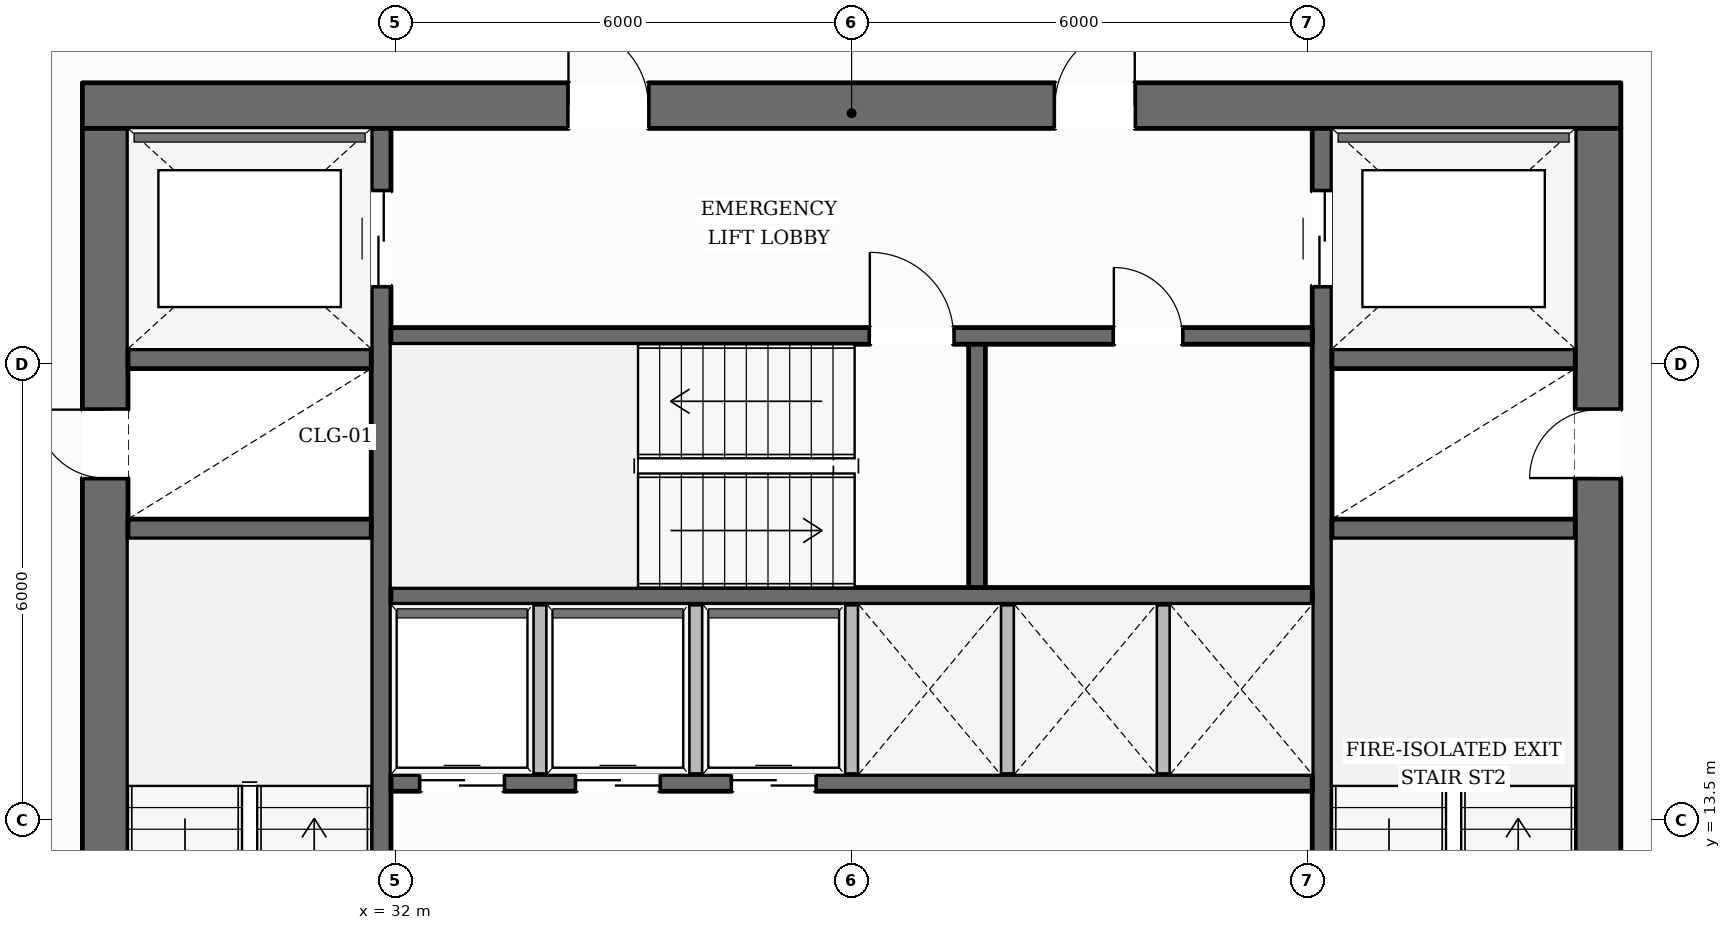
"""IFC4 building model, lengths in metres.
Left out: names, types, materials, properties, quantities, classifications, styles, units other than length and angle.
Written with IfcOpenShell. Run it as: python <this file> out.ifc"""

import sys

from ifc_helpers import new_model, si_unit, direction, frame, frame_2d, origin, place, context, subcontext, project, spatial, rectangle, extrude, element, fill, save


model = new_model("IFC4")
c1 = context("Model", 3, precision=1e-05, world=origin(), true_north=direction((0.0, 1.0)))
c2 = subcontext(c1, "Body", "Model", "MODEL_VIEW")
j1 = project(units=[si_unit("LENGTHUNIT", "METRE"), si_unit("PLANEANGLEUNIT", "RADIAN")], contexts=[c1])
p1 = place(None, origin())
s1 = spatial("IfcSite", under=j1, at=p1, CompositionType="ELEMENT")
p2 = place(p1, origin())
s2 = spatial("IfcBuilding", under=s1, at=p2, CompositionType="ELEMENT")
p3 = place(p2, frame((0.0, 0.0, 29.1)))
s3 = spatial("IfcBuildingStorey", under=s2, at=p3, CompositionType="ELEMENT", Elevation=29.1)
p4 = place(p3, frame((27.88, 22.9, 0.0), z_axis=(0.0, 0.0, 1.0), x_axis=(1.0, 0.0, 0.0)))
e1 = element("IfcWall", 1, at=p4, inside=s3, PredefinedType="SOLIDWALL", context=c2, shape_type="SweptSolid", body=[
    extrude(rectangle(XDim=20.24, YDim=0.6, at=frame_2d((10.12, 0.0))), origin(), (0.0, 0.0, 1.0), 3.59),
])
p5 = place(p4, frame((6.395, 0.0, 0.0)))
e2 = element("IfcOpeningElement", 2, at=p5, cuts=e1, PredefinedType="OPENING", context=c2, shape_type="SweptSolid", body=[
    extrude(rectangle(XDim=1.05, YDim=2.15, at=frame_2d((0.525, 1.075))), frame((0.0, 0.31, 0.0), z_axis=(0.0, -1.0, 0.0), x_axis=(1.0, 0.0, 0.0)), (0.0, 0.0, 1.0), 0.62),
])
p6 = place(p4, frame((12.795, 0.0, 0.0)))
e3 = element("IfcOpeningElement", 3, at=p6, cuts=e1, PredefinedType="OPENING", context=c2, shape_type="SweptSolid", body=[
    extrude(rectangle(XDim=1.05, YDim=2.15, at=frame_2d((0.525, 1.075))), frame((0.0, 0.31, 0.0), z_axis=(0.0, -1.0, 0.0), x_axis=(1.0, 0.0, 0.0)), (0.0, 0.0, 1.0), 0.62),
])
p7 = place(p3, frame((28.18, 9.6, 0.0), z_axis=(0.0, 0.0, 1.0), x_axis=(0.0, 1.0, 0.0)))
e4 = element("IfcWall", 4, at=p7, inside=s3, PredefinedType="SOLIDWALL", context=c2, shape_type="SweptSolid", body=[
    extrude(rectangle(XDim=13.0, YDim=0.6, at=frame_2d((6.5, 0.0))), origin(), (0.0, 0.0, 1.0), 3.59),
])
p8 = place(p7, frame((0.2, 0.0, 0.0)))
e5 = element("IfcOpeningElement", 5, at=p8, cuts=e4, PredefinedType="OPENING", context=c2, shape_type="SweptSolid", body=[
    extrude(rectangle(XDim=1.1, YDim=2.15, at=frame_2d((0.55, 1.075))), frame((0.0, 0.31, 0.0), z_axis=(0.0, -1.0, 0.0), x_axis=(1.0, 0.0, 0.0)), (0.0, 0.0, 1.0), 0.62),
])
p9 = place(p7, frame((8.4, 0.0, 0.0)))
e6 = element("IfcOpeningElement", 6, at=p9, cuts=e4, PredefinedType="OPENING", context=c2, shape_type="SweptSolid", body=[
    extrude(rectangle(XDim=0.9, YDim=2.1, at=frame_2d((0.45, 1.05))), frame((0.0, 0.31, 0.0), z_axis=(0.0, -1.0, 0.0), x_axis=(1.0, 0.0, 0.0)), (0.0, 0.0, 1.0), 0.62),
])
p10 = place(p3, frame((47.82, 9.6, 0.0), z_axis=(0.0, 0.0, 1.0), x_axis=(0.0, 1.0, 0.0)))
e7 = element("IfcWall", 7, at=p10, inside=s3, PredefinedType="SOLIDWALL", context=c2, shape_type="SweptSolid", body=[
    extrude(rectangle(XDim=13.0, YDim=0.6, at=frame_2d((6.5, 0.0))), origin(), (0.0, 0.0, 1.0), 3.59),
])
p11 = place(p10, frame((0.2, 0.0, 0.0)))
e8 = element("IfcOpeningElement", 8, at=p11, cuts=e7, PredefinedType="OPENING", context=c2, shape_type="SweptSolid", body=[
    extrude(rectangle(XDim=1.1, YDim=2.15, at=frame_2d((0.55, 1.075))), frame((0.0, 0.31, 0.0), z_axis=(0.0, -1.0, 0.0), x_axis=(1.0, 0.0, 0.0)), (0.0, 0.0, 1.0), 0.62),
])
p12 = place(p10, frame((8.4, 0.0, 0.0)))
e9 = element("IfcOpeningElement", 9, at=p12, cuts=e7, PredefinedType="OPENING", context=c2, shape_type="SweptSolid", body=[
    extrude(rectangle(XDim=0.9, YDim=2.1, at=frame_2d((0.45, 1.05))), frame((0.0, 0.31, 0.0), z_axis=(0.0, -1.0, 0.0), x_axis=(1.0, 0.0, 0.0)), (0.0, 0.0, 1.0), 0.62),
])
p13 = place(p3, frame((31.81, 9.6, 0.0), z_axis=(0.0, 0.0, 1.0), x_axis=(0.0, 1.0, 0.0)))
e10 = element("IfcWall", 10, at=p13, inside=s3, PredefinedType="SHEAR", context=c2, shape_type="SweptSolid", body=[
    extrude(rectangle(XDim=13.0, YDim=0.26, at=frame_2d((6.5, 0.0))), origin(), (0.0, 0.0, 1.0), 3.59),
])
p14 = place(p13, frame((10.925, 0.0, 0.0)))
e11 = element("IfcOpeningElement", 11, at=p14, cuts=e10, PredefinedType="OPENING", context=c2, shape_type="SweptSolid", body=[
    extrude(rectangle(XDim=1.25, YDim=2.25, at=frame_2d((0.625, 1.125))), frame((0.0, 0.14, 0.0), z_axis=(0.0, -1.0, 0.0), x_axis=(1.0, 0.0, 0.0)), (0.0, 0.0, 1.0), 0.28),
])
p15 = place(p3, frame((44.19, 9.6, 0.0), z_axis=(0.0, 0.0, 1.0), x_axis=(0.0, 1.0, 0.0)))
e12 = element("IfcWall", 12, at=p15, inside=s3, PredefinedType="SHEAR", context=c2, shape_type="SweptSolid", body=[
    extrude(rectangle(XDim=13.0, YDim=0.26, at=frame_2d((6.5, 0.0))), origin(), (0.0, 0.0, 1.0), 3.59),
])
p16 = place(p15, frame((10.925, 0.0, 0.0)))
e13 = element("IfcOpeningElement", 13, at=p16, cuts=e12, PredefinedType="OPENING", context=c2, shape_type="SweptSolid", body=[
    extrude(rectangle(XDim=1.25, YDim=2.25, at=frame_2d((0.625, 1.125))), frame((0.0, 0.14, 0.0), z_axis=(0.0, -1.0, 0.0), x_axis=(1.0, 0.0, 0.0)), (0.0, 0.0, 1.0), 0.28),
])
for number, where, z_axis, x_axis in (
    (14, (28.48, 17.33, 0.0), (0.0, 0.0, 1.0), (1.0, 0.0, 0.0)),
    (15, (28.48, 19.57, 0.0), (0.0, 0.0, 1.0), (1.0, 0.0, 0.0)),
    (16, (44.32, 17.33, 0.0), (0.0, 0.0, 1.0), (1.0, 0.0, 0.0)),
    (17, (44.32, 19.57, 0.0), (0.0, 0.0, 1.0), (1.0, 0.0, 0.0)),
):
    element("IfcWall", number, at=place(p3, frame(where, z_axis=z_axis, x_axis=x_axis)), inside=s3, PredefinedType="SHEAR", context=c2, shape_type="SweptSolid", body=[
        extrude(rectangle(XDim=3.2, YDim=0.26, at=frame_2d((1.6, 0.0))), origin(), (0.0, 0.0, 1.0), 3.59),
    ])
p17 = place(p3, frame((31.94, 19.87, 0.0), z_axis=(0.0, 0.0, 1.0), x_axis=(1.0, 0.0, 0.0)))
e18 = element("IfcWall", 18, at=p17, inside=s3, PredefinedType="SOLIDWALL", context=c2, shape_type="SweptSolid", body=[
    extrude(rectangle(XDim=12.12, YDim=0.22, at=frame_2d((6.06, 0.0))), origin(), (0.0, 0.0, 1.0), 3.59),
])
p18 = place(p17, frame((6.3, 0.0, 0.0)))
e19 = element("IfcOpeningElement", 19, at=p18, cuts=e18, PredefinedType="OPENING", context=c2, shape_type="SweptSolid", body=[
    extrude(rectangle(XDim=1.1, YDim=2.15, at=frame_2d((0.55, 1.075))), frame((0.0, 0.12, 0.0), z_axis=(0.0, -1.0, 0.0), x_axis=(1.0, 0.0, 0.0)), (0.0, 0.0, 1.0), 0.24),
])
p19 = place(p17, frame((9.51, 0.0, 0.0)))
e20 = element("IfcOpeningElement", 20, at=p19, cuts=e18, PredefinedType="OPENING", context=c2, shape_type="SweptSolid", body=[
    extrude(rectangle(XDim=0.9, YDim=2.1, at=frame_2d((0.45, 1.05))), frame((0.0, 0.12, 0.0), z_axis=(0.0, -1.0, 0.0), x_axis=(1.0, 0.0, 0.0)), (0.0, 0.0, 1.0), 0.24),
])
p20 = place(p3, frame((31.94, 16.45, 0.0), z_axis=(0.0, 0.0, 1.0), x_axis=(1.0, 0.0, 0.0)))
e21 = element("IfcWall", 21, at=p20, inside=s3, PredefinedType="SOLIDWALL", context=c2, shape_type="SweptSolid", body=[
    extrude(rectangle(XDim=12.12, YDim=0.22, at=frame_2d((6.06, 0.0))), origin(), (0.0, 0.0, 1.0), 3.59),
])
p21 = place(p3, frame((39.65, 16.56, 0.0), z_axis=(0.0, 0.0, 1.0), x_axis=(0.0, 1.0, 0.0)))
e22 = element("IfcWall", 22, at=p21, inside=s3, PredefinedType="SOLIDWALL", context=c2, shape_type="SweptSolid", body=[
    extrude(rectangle(XDim=3.2, YDim=0.22, at=frame_2d((1.6, 0.0))), origin(), (0.0, 0.0, 1.0), 3.59),
])
p22 = place(p3, frame((31.94, 13.99, 0.0), z_axis=(0.0, 0.0, 1.0), x_axis=(1.0, 0.0, 0.0)))
e23 = element("IfcWall", 23, at=p22, inside=s3, PredefinedType="SOLIDWALL", context=c2, shape_type="SweptSolid", body=[
    extrude(rectangle(XDim=12.12, YDim=0.22, at=frame_2d((6.06, 0.0))), origin(), (0.0, 0.0, 1.0), 3.59),
])
p23 = place(p22, frame((0.385, 0.0, 0.0)))
e24 = element("IfcOpeningElement", 24, at=p23, cuts=e23, PredefinedType="OPENING", context=c2, shape_type="SweptSolid", body=[
    extrude(rectangle(XDim=1.1, YDim=2.2, at=frame_2d((0.55, 1.1))), frame((0.0, 0.12, 0.0), z_axis=(0.0, -1.0, 0.0), x_axis=(1.0, 0.0, 0.0)), (0.0, 0.0, 1.0), 0.24),
])
p24 = place(p22, frame((2.435, 0.0, 0.0)))
e25 = element("IfcOpeningElement", 25, at=p24, cuts=e23, PredefinedType="OPENING", context=c2, shape_type="SweptSolid", body=[
    extrude(rectangle(XDim=1.1, YDim=2.2, at=frame_2d((0.55, 1.1))), frame((0.0, 0.12, 0.0), z_axis=(0.0, -1.0, 0.0), x_axis=(1.0, 0.0, 0.0)), (0.0, 0.0, 1.0), 0.24),
])
p25 = place(p22, frame((4.485, 0.0, 0.0)))
e26 = element("IfcOpeningElement", 26, at=p25, cuts=e23, PredefinedType="OPENING", context=c2, shape_type="SweptSolid", body=[
    extrude(rectangle(XDim=1.1, YDim=2.2, at=frame_2d((0.55, 1.1))), frame((0.0, 0.12, 0.0), z_axis=(0.0, -1.0, 0.0), x_axis=(1.0, 0.0, 0.0)), (0.0, 0.0, 1.0), 0.24),
])
p26 = place(p3, frame((13.263, 14.928, 0.0), z_axis=(0.0, 0.0, 1.0), x_axis=(0.495711630902, 0.868487178367, 0.0)))
e27 = element("IfcWall", 27, at=p26, inside=s3, PredefinedType="STANDARD", context=c2, shape_type="SweptSolid", body=[
    extrude(rectangle(XDim=34.092, YDim=0.38, at=frame_2d((17.046, 0.0))), origin(), (0.0, 0.0, 1.0), 2.97),
])
p27 = place(p26, frame((30.027, 0.0, 0.65)))
e28 = element("IfcOpeningElement", 28, at=p27, cuts=e27, PredefinedType="OPENING", context=c2, shape_type="SweptSolid", body=[
    extrude(rectangle(XDim=1.65, YDim=1.75, at=frame_2d((0.825, 0.875))), frame((0.0, 0.2, 0.0), z_axis=(0.0, -1.0, 0.0), x_axis=(1.0, 0.0, 0.0)), (0.0, 0.0, 1.0), 0.4),
])
p28 = place(p26, frame((24.504, 0.0, 0.65)))
e29 = element("IfcOpeningElement", 29, at=p28, cuts=e27, PredefinedType="OPENING", context=c2, shape_type="SweptSolid", body=[
    extrude(rectangle(XDim=1.65, YDim=1.75, at=frame_2d((0.825, 0.875))), frame((0.0, 0.2, 0.0), z_axis=(0.0, -1.0, 0.0), x_axis=(1.0, 0.0, 0.0)), (0.0, 0.0, 1.0), 0.4),
])
p29 = place(p26, frame((13.457, 0.0, 0.65)))
e30 = element("IfcOpeningElement", 30, at=p29, cuts=e27, PredefinedType="OPENING", context=c2, shape_type="SweptSolid", body=[
    extrude(rectangle(XDim=1.65, YDim=1.75, at=frame_2d((0.825, 0.875))), frame((0.0, 0.2, 0.0), z_axis=(0.0, -1.0, 0.0), x_axis=(1.0, 0.0, 0.0)), (0.0, 0.0, 1.0), 0.4),
])
p30 = place(p26, frame((7.934, 0.0, 0.65)))
e31 = element("IfcOpeningElement", 31, at=p30, cuts=e27, PredefinedType="OPENING", context=c2, shape_type="SweptSolid", body=[
    extrude(rectangle(XDim=1.65, YDim=1.75, at=frame_2d((0.825, 0.875))), frame((0.0, 0.2, 0.0), z_axis=(0.0, -1.0, 0.0), x_axis=(1.0, 0.0, 0.0)), (0.0, 0.0, 1.0), 0.4),
])
p31 = place(p26, frame((2.411, 0.0, 0.65)))
e32 = element("IfcOpeningElement", 32, at=p31, cuts=e27, PredefinedType="OPENING", context=c2, shape_type="SweptSolid", body=[
    extrude(rectangle(XDim=1.65, YDim=1.75, at=frame_2d((0.825, 0.875))), frame((0.0, 0.2, 0.0), z_axis=(0.0, -1.0, 0.0), x_axis=(1.0, 0.0, 0.0)), (0.0, 0.0, 1.0), 0.4),
])
p32 = place(p3, frame((45.837, 44.537, 0.0), z_axis=(0.0, 0.0, 1.0), x_axis=(0.495711630902, -0.868487178367, 0.0)))
e33 = element("IfcWall", 33, at=p32, inside=s3, PredefinedType="STANDARD", context=c2, shape_type="SweptSolid", body=[
    extrude(rectangle(XDim=34.092, YDim=0.38, at=frame_2d((17.046, 0.0))), origin(), (0.0, 0.0, 1.0), 2.97),
])
p33 = place(p32, frame((30.031, 0.0, 0.65)))
e34 = element("IfcOpeningElement", 34, at=p33, cuts=e33, PredefinedType="OPENING", context=c2, shape_type="SweptSolid", body=[
    extrude(rectangle(XDim=1.65, YDim=1.75, at=frame_2d((0.825, 0.875))), frame((0.0, 0.2, 0.0), z_axis=(0.0, -1.0, 0.0), x_axis=(1.0, 0.0, 0.0)), (0.0, 0.0, 1.0), 0.4),
])
p34 = place(p32, frame((24.508, 0.0, 0.65)))
e35 = element("IfcOpeningElement", 35, at=p34, cuts=e33, PredefinedType="OPENING", context=c2, shape_type="SweptSolid", body=[
    extrude(rectangle(XDim=1.65, YDim=1.75, at=frame_2d((0.825, 0.875))), frame((0.0, 0.2, 0.0), z_axis=(0.0, -1.0, 0.0), x_axis=(1.0, 0.0, 0.0)), (0.0, 0.0, 1.0), 0.4),
])
p35 = place(p32, frame((13.462, 0.0, 0.65)))
e36 = element("IfcOpeningElement", 36, at=p35, cuts=e33, PredefinedType="OPENING", context=c2, shape_type="SweptSolid", body=[
    extrude(rectangle(XDim=1.65, YDim=1.75, at=frame_2d((0.825, 0.875))), frame((0.0, 0.2, 0.0), z_axis=(0.0, -1.0, 0.0), x_axis=(1.0, 0.0, 0.0)), (0.0, 0.0, 1.0), 0.4),
])
p36 = place(p32, frame((7.939, 0.0, 0.65)))
e37 = element("IfcOpeningElement", 37, at=p36, cuts=e33, PredefinedType="OPENING", context=c2, shape_type="SweptSolid", body=[
    extrude(rectangle(XDim=1.65, YDim=1.75, at=frame_2d((0.825, 0.875))), frame((0.0, 0.2, 0.0), z_axis=(0.0, -1.0, 0.0), x_axis=(1.0, 0.0, 0.0)), (0.0, 0.0, 1.0), 0.4),
])
p37 = place(p32, frame((2.415, 0.0, 0.65)))
e38 = element("IfcOpeningElement", 38, at=p37, cuts=e33, PredefinedType="OPENING", context=c2, shape_type="SweptSolid", body=[
    extrude(rectangle(XDim=1.65, YDim=1.75, at=frame_2d((0.825, 0.875))), frame((0.0, 0.2, 0.0), z_axis=(0.0, -1.0, 0.0), x_axis=(1.0, 0.0, 0.0)), (0.0, 0.0, 1.0), 0.4),
])
for number, where, z_axis, x_axis in (
    (39, (33.9, 14.1, 0.0), (0.0, 0.0, 1.0), (0.0, 1.0, 0.0)),
    (40, (35.95, 14.1, 0.0), (0.0, 0.0, 1.0), (0.0, 1.0, 0.0)),
    (41, (38.0, 14.1, 0.0), (0.0, 0.0, 1.0), (0.0, 1.0, 0.0)),
    (42, (40.05, 14.1, 0.0), (0.0, 0.0, 1.0), (0.0, 1.0, 0.0)),
    (43, (42.1, 14.1, 0.0), (0.0, 0.0, 1.0), (0.0, 1.0, 0.0)),
):
    element("IfcWall", number, at=place(p3, frame(where, z_axis=z_axis, x_axis=x_axis)), inside=s3, PredefinedType="PARTITIONING", context=c2, shape_type="SweptSolid", body=[
        extrude(rectangle(XDim=2.24, YDim=0.165, at=frame_2d((1.12, 0.0))), origin(), (0.0, 0.0, 1.0), 3.59),
    ])
p38 = place(p18, origin())
e44 = element("IfcDoor", 44, at=p38, inside=s3, OperationType="SINGLE_SWING_LEFT", PredefinedType="DOOR", context=c2, shape_type="SweptSolid", body=[
    extrude(rectangle(XDim=1.1, YDim=2.15, at=frame_2d((0.55, 1.075))), frame((0.0, 0.025, 0.0), z_axis=(0.0, -1.0, 0.0), x_axis=(1.0, 0.0, 0.0)), (0.0, 0.0, 1.0), 0.05),
])
fill(e19, e44)
p39 = place(p9, origin())
e45 = element("IfcDoor", 45, at=p39, inside=s3, OperationType="SINGLE_SWING_RIGHT", PredefinedType="DOOR", context=c2, shape_type="SweptSolid", body=[
    extrude(rectangle(XDim=0.9, YDim=2.1, at=frame_2d((0.45, 1.05))), frame((0.0, 0.025, 0.0), z_axis=(0.0, -1.0, 0.0), x_axis=(1.0, 0.0, 0.0)), (0.0, 0.0, 1.0), 0.05),
])
fill(e6, e45)
p40 = place(p12, origin())
e46 = element("IfcDoor", 46, at=p40, inside=s3, OperationType="SINGLE_SWING_LEFT", PredefinedType="DOOR", context=c2, shape_type="SweptSolid", body=[
    extrude(rectangle(XDim=0.9, YDim=2.1, at=frame_2d((0.45, 1.05))), frame((0.0, 0.025, 0.0), z_axis=(0.0, -1.0, 0.0), x_axis=(1.0, 0.0, 0.0)), (0.0, 0.0, 1.0), 0.05),
])
fill(e9, e46)
p41 = place(p5, origin())
e47 = element("IfcDoor", 47, at=p41, inside=s3, OperationType="SINGLE_SWING_LEFT", PredefinedType="DOOR", context=c2, shape_type="SweptSolid", body=[
    extrude(rectangle(XDim=1.05, YDim=2.15, at=frame_2d((0.525, 1.075))), frame((0.0, 0.025, 0.0), z_axis=(0.0, -1.0, 0.0), x_axis=(1.0, 0.0, 0.0)), (0.0, 0.0, 1.0), 0.05),
])
fill(e2, e47)
p42 = place(p6, origin())
e48 = element("IfcDoor", 48, at=p42, inside=s3, OperationType="SINGLE_SWING_RIGHT", PredefinedType="DOOR", context=c2, shape_type="SweptSolid", body=[
    extrude(rectangle(XDim=1.05, YDim=2.15, at=frame_2d((0.525, 1.075))), frame((0.0, 0.025, 0.0), z_axis=(0.0, -1.0, 0.0), x_axis=(1.0, 0.0, 0.0)), (0.0, 0.0, 1.0), 0.05),
])
fill(e3, e48)
p43 = place(p14, origin())
e49 = element("IfcDoor", 49, at=p43, inside=s3, OperationType="DOUBLE_DOOR_SLIDING", PredefinedType="DOOR", context=c2, shape_type="SweptSolid", body=[
    extrude(rectangle(XDim=1.25, YDim=2.25, at=frame_2d((0.625, 1.125))), frame((0.0, 0.025, 0.0), z_axis=(0.0, -1.0, 0.0), x_axis=(1.0, 0.0, 0.0)), (0.0, 0.0, 1.0), 0.05),
])
fill(e11, e49)
p44 = place(p16, origin())
e50 = element("IfcDoor", 50, at=p44, inside=s3, OperationType="DOUBLE_DOOR_SLIDING", PredefinedType="DOOR", context=c2, shape_type="SweptSolid", body=[
    extrude(rectangle(XDim=1.25, YDim=2.25, at=frame_2d((0.625, 1.125))), frame((0.0, 0.025, 0.0), z_axis=(0.0, -1.0, 0.0), x_axis=(1.0, 0.0, 0.0)), (0.0, 0.0, 1.0), 0.05),
])
fill(e13, e50)
p45 = place(p23, origin())
e51 = element("IfcDoor", 51, at=p45, inside=s3, OperationType="DOUBLE_DOOR_SLIDING", PredefinedType="DOOR", context=c2, shape_type="SweptSolid", body=[
    extrude(rectangle(XDim=1.1, YDim=2.2, at=frame_2d((0.55, 1.1))), frame((0.0, 0.025, 0.0), z_axis=(0.0, -1.0, 0.0), x_axis=(1.0, 0.0, 0.0)), (0.0, 0.0, 1.0), 0.05),
])
fill(e24, e51)
p46 = place(p24, origin())
e52 = element("IfcDoor", 52, at=p46, inside=s3, OperationType="DOUBLE_DOOR_SLIDING", PredefinedType="DOOR", context=c2, shape_type="SweptSolid", body=[
    extrude(rectangle(XDim=1.1, YDim=2.2, at=frame_2d((0.55, 1.1))), frame((0.0, 0.025, 0.0), z_axis=(0.0, -1.0, 0.0), x_axis=(1.0, 0.0, 0.0)), (0.0, 0.0, 1.0), 0.05),
])
fill(e25, e52)
p47 = place(p25, origin())
e53 = element("IfcDoor", 53, at=p47, inside=s3, OperationType="DOUBLE_DOOR_SLIDING", PredefinedType="DOOR", context=c2, shape_type="SweptSolid", body=[
    extrude(rectangle(XDim=1.1, YDim=2.2, at=frame_2d((0.55, 1.1))), frame((0.0, 0.025, 0.0), z_axis=(0.0, -1.0, 0.0), x_axis=(1.0, 0.0, 0.0)), (0.0, 0.0, 1.0), 0.05),
])
fill(e26, e53)
p48 = place(p19, origin())
e54 = element("IfcDoor", 54, at=p48, inside=s3, OperationType="SINGLE_SWING_LEFT", PredefinedType="DOOR", context=c2, shape_type="SweptSolid", body=[
    extrude(rectangle(XDim=0.9, YDim=2.1, at=frame_2d((0.45, 1.05))), frame((0.0, 0.025, 0.0), z_axis=(0.0, -1.0, 0.0), x_axis=(1.0, 0.0, 0.0)), (0.0, 0.0, 1.0), 0.05),
])
fill(e20, e54)
save(model, sys.argv[1])
